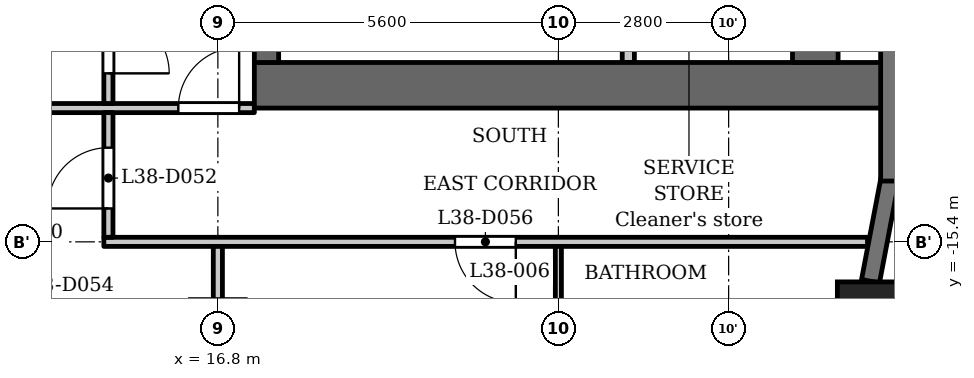
"""IFC4 building model, lengths in metres.
Left out: names, types, materials, properties, quantities, classifications, styles, units other than length and angle.
Written with IfcOpenShell. Run it as: python <this file> out.ifc"""

import sys

from ifc_helpers import new_model, si_unit, direction, frame, frame_2d, origin, origin_2d, place, context, subcontext, project, spatial, rectangle, extrude, element, fill, save


model = new_model("IFC4")
c1 = context("Model", 3, precision=1e-05, world=origin(), true_north=direction((0.0, 1.0)))
c2 = subcontext(c1, "Body", "Model", "MODEL_VIEW")
j1 = project(units=[si_unit("LENGTHUNIT", "METRE"), si_unit("PLANEANGLEUNIT", "RADIAN")], contexts=[c1])
p1 = place(None, origin())
s1 = spatial("IfcSite", under=j1, at=p1, CompositionType="ELEMENT")
p2 = place(p1, origin())
s2 = spatial("IfcBuilding", under=s1, at=p2, CompositionType="ELEMENT")
p3 = place(p2, frame((0.0, 0.0, 150.1)))
s3 = spatial("IfcBuildingStorey", under=s2, at=p3, CompositionType="ELEMENT", Elevation=150.1)
p4 = place(p3, frame((27.538, -16.609, 0.0), z_axis=(0.0, 0.0, 1.0), x_axis=(1.0, 0.0, 0.0)))
e1 = element("IfcColumn", 1, at=p4, inside=s3, PredefinedType="COLUMN", context=c2, shape_type="SweptSolid", body=[
    extrude(rectangle(XDim=1.1, YDim=1.1, at=origin_2d()), origin(), (0.0, 0.0, 1.0), 3.5),
])
p5 = place(p3, frame((27.533, -16.048, 0.0), z_axis=(0.0, 0.0, 1.0), x_axis=(0.187302784601, 0.982302227871, 0.0)))
e2 = element("IfcWall", 2, at=p5, inside=s3, PredefinedType="SOLIDWALL", context=c2, shape_type="SweptSolid", body=[
    extrude(rectangle(XDim=1.706, YDim=0.3, at=frame_2d((0.853, 0.0))), origin(), (0.0, 0.0, 1.0), 2.45),
])
p6 = place(p3, frame((27.85, -14.4, 0.0), z_axis=(0.0, 0.0, 1.0), x_axis=(0.0, 1.0, 0.0)))
e3 = element("IfcWall", 3, at=p6, inside=s3, PredefinedType="SOLIDWALL", context=c2, shape_type="SweptSolid", body=[
    extrude(rectangle(XDim=2.65, YDim=0.3, at=frame_2d((1.325, 0.0))), origin(), (0.0, 0.0, 1.0), 2.45),
])
p7 = place(p3, frame((17.4, -12.825, 0.0), z_axis=(0.0, 0.0, 1.0), x_axis=(1.0, 0.0, 0.0)))
e4 = element("IfcWall", 4, at=p7, inside=s3, PredefinedType="SHEAR", context=c2, shape_type="SweptSolid", body=[
    extrude(rectangle(XDim=10.4, YDim=0.75, at=frame_2d((5.2, 0.0))), origin(), (0.0, 0.0, 1.0), 3.2),
])
p8 = place(p3, frame((17.6, -12.45, 0.0), z_axis=(0.0, 0.0, 1.0), x_axis=(0.0, 1.0, 0.0)))
e5 = element("IfcWall", 5, at=p8, inside=s3, PredefinedType="SHEAR", context=c2, shape_type="SweptSolid", body=[
    extrude(rectangle(XDim=24.9, YDim=0.4, at=frame_2d((12.45, 0.0))), origin(), (0.0, 0.0, 1.0), 3.2),
])
p9 = place(p8, frame((6.325, 0.0, 0.0)))
e6 = element("IfcOpeningElement", 6, at=p9, cuts=e5, PredefinedType="OPENING", context=c2, shape_type="SweptSolid", body=[
    extrude(rectangle(XDim=0.9, YDim=2.1, at=frame_2d((0.45, 1.05))), frame((0.0, 0.21, 0.0), z_axis=(0.0, -1.0, 0.0), x_axis=(1.0, 0.0, 0.0)), (0.0, 0.0, 1.0), 0.42),
])
p10 = place(p8, frame((9.925, 0.0, 0.0)))
e7 = element("IfcOpeningElement", 7, at=p10, cuts=e5, PredefinedType="OPENING", context=c2, shape_type="SweptSolid", body=[
    extrude(rectangle(XDim=0.9, YDim=2.1, at=frame_2d((0.45, 1.05))), frame((0.0, 0.21, 0.0), z_axis=(0.0, -1.0, 0.0), x_axis=(1.0, 0.0, 0.0)), (0.0, 0.0, 1.0), 0.42),
])
p11 = place(p8, frame((15.6, 0.0, 0.0)))
e8 = element("IfcOpeningElement", 8, at=p11, cuts=e5, PredefinedType="OPENING", context=c2, shape_type="SweptSolid", body=[
    extrude(rectangle(XDim=1.1, YDim=2.1, at=frame_2d((0.55, 1.05))), frame((0.0, 0.21, 0.0), z_axis=(0.0, -1.0, 0.0), x_axis=(1.0, 0.0, 0.0)), (0.0, 0.0, 1.0), 0.42),
])
p12 = place(p8, frame((18.0, 0.0, 0.0)))
e9 = element("IfcOpeningElement", 9, at=p12, cuts=e5, PredefinedType="OPENING", context=c2, shape_type="SweptSolid", body=[
    extrude(rectangle(XDim=1.1, YDim=2.1, at=frame_2d((0.55, 1.05))), frame((0.0, 0.21, 0.0), z_axis=(0.0, -1.0, 0.0), x_axis=(1.0, 0.0, 0.0)), (0.0, 0.0, 1.0), 0.42),
])
p13 = place(p8, frame((23.025, 0.0, 0.0)))
e10 = element("IfcOpeningElement", 10, at=p13, cuts=e5, PredefinedType="OPENING", context=c2, shape_type="SweptSolid", body=[
    extrude(rectangle(XDim=1.1, YDim=2.1, at=frame_2d((0.55, 1.05))), frame((0.0, 0.21, 0.0), z_axis=(0.0, -1.0, 0.0), x_axis=(1.0, 0.0, 0.0)), (0.0, 0.0, 1.0), 0.42),
])
p14 = place(p8, frame((0.775, 0.0, 0.0)))
e11 = element("IfcOpeningElement", 11, at=p14, cuts=e5, PredefinedType="OPENING", context=c2, shape_type="SweptSolid", body=[
    extrude(rectangle(XDim=1.1, YDim=2.1, at=frame_2d((0.55, 1.05))), frame((0.0, 0.21, 0.0), z_axis=(0.0, -1.0, 0.0), x_axis=(1.0, 0.0, 0.0)), (0.0, 0.0, 1.0), 0.42),
])
p15 = place(p8, frame((12.925, 0.0, 0.0)))
e12 = element("IfcOpeningElement", 12, at=p15, cuts=e5, PredefinedType="OPENING", context=c2, shape_type="SweptSolid", body=[
    extrude(rectangle(XDim=1.8, YDim=2.1, at=frame_2d((0.9, 1.05))), frame((0.0, 0.21, 0.0), z_axis=(0.0, -1.0, 0.0), x_axis=(1.0, 0.0, 0.0)), (0.0, 0.0, 1.0), 0.42),
])
p16 = place(p3, frame((26.625, -12.45, 0.0), z_axis=(0.0, 0.0, 1.0), x_axis=(0.0, 1.0, 0.0)))
e13 = element("IfcWall", 13, at=p16, inside=s3, PredefinedType="SHEAR", context=c2, shape_type="SweptSolid", body=[
    extrude(rectangle(XDim=24.9, YDim=0.75, at=frame_2d((12.45, 0.0))), origin(), (0.0, 0.0, 1.0), 3.2),
])
p17 = place(p3, frame((23.55, -12.45, 0.0), z_axis=(0.0, 0.0, 1.0), x_axis=(0.0, 1.0, 0.0)))
e14 = element("IfcWall", 14, at=p17, inside=s3, PredefinedType="PARTITIONING", context=c2, shape_type="SweptSolid", body=[
    extrude(rectangle(XDim=2.65, YDim=0.2, at=frame_2d((1.325, 0.0))), origin(), (0.0, 0.0, 1.0), 3.2),
])
p18 = place(p17, frame((0.875, 0.0, 0.0)))
e15 = element("IfcOpeningElement", 15, at=p18, cuts=e14, PredefinedType="OPENING", context=c2, shape_type="SweptSolid", body=[
    extrude(rectangle(XDim=0.9, YDim=2.1, at=frame_2d((0.45, 1.05))), frame((0.0, 0.11, 0.0), z_axis=(0.0, -1.0, 0.0), x_axis=(1.0, 0.0, 0.0)), (0.0, 0.0, 1.0), 0.22),
])
p19 = place(p3, frame((14.925, -15.4, 0.0), z_axis=(0.0, 0.0, 1.0), x_axis=(1.0, 0.0, 0.0)))
e16 = element("IfcWall", 16, at=p19, inside=s3, PredefinedType="PARTITIONING", context=c2, shape_type="SweptSolid", body=[
    extrude(rectangle(XDim=12.559, YDim=0.15, at=frame_2d((6.279, 0.0))), origin(), (0.0, 0.0, 1.0), 3.2),
])
p20 = place(p19, frame((5.775, 0.0, 0.0)))
e17 = element("IfcOpeningElement", 17, at=p20, cuts=e16, PredefinedType="OPENING", context=c2, shape_type="SweptSolid", body=[
    extrude(rectangle(XDim=1.0, YDim=2.1, at=frame_2d((0.5, 1.05))), frame((0.0, 0.085, 0.0), z_axis=(0.0, -1.0, 0.0), x_axis=(1.0, 0.0, 0.0)), (0.0, 0.0, 1.0), 0.17),
])
p21 = place(p3, frame((-17.4, -13.2, 0.0), z_axis=(0.0, 0.0, 1.0), x_axis=(1.0, 0.0, 0.0)))
e18 = element("IfcWall", 18, at=p21, inside=s3, PredefinedType="PARTITIONING", context=c2, shape_type="SweptSolid", body=[
    extrude(rectangle(XDim=34.8, YDim=0.15, at=frame_2d((17.4, 0.0))), origin(), (0.0, 0.0, 1.0), 3.2),
])
p22 = place(p21, frame((0.15, 0.0, 0.0)))
e19 = element("IfcOpeningElement", 19, at=p22, cuts=e18, PredefinedType="OPENING", context=c2, shape_type="SweptSolid", body=[
    extrude(rectangle(XDim=1.0, YDim=2.1, at=frame_2d((0.5, 1.05))), frame((0.0, 0.085, 0.0), z_axis=(0.0, -1.0, 0.0), x_axis=(1.0, 0.0, 0.0)), (0.0, 0.0, 1.0), 0.17),
])
p23 = place(p21, frame((33.55, 0.0, 0.0)))
e20 = element("IfcOpeningElement", 20, at=p23, cuts=e18, PredefinedType="OPENING", context=c2, shape_type="SweptSolid", body=[
    extrude(rectangle(XDim=1.0, YDim=2.1, at=frame_2d((0.5, 1.05))), frame((0.0, 0.085, 0.0), z_axis=(0.0, -1.0, 0.0), x_axis=(1.0, 0.0, 0.0)), (0.0, 0.0, 1.0), 0.17),
])
p24 = place(p21, frame((15.7, 0.0, 0.0)))
e21 = element("IfcOpeningElement", 21, at=p24, cuts=e18, PredefinedType="OPENING", context=c2, shape_type="SweptSolid", body=[
    extrude(rectangle(XDim=1.0, YDim=2.1, at=frame_2d((0.5, 1.05))), frame((0.0, 0.085, 0.0), z_axis=(0.0, -1.0, 0.0), x_axis=(1.0, 0.0, 0.0)), (0.0, 0.0, 1.0), 0.17),
])
p25 = place(p3, frame((15.0, -15.325, 0.0), z_axis=(0.0, 0.0, 1.0), x_axis=(0.0, 1.0, 0.0)))
e22 = element("IfcWall", 22, at=p25, inside=s3, PredefinedType="PARTITIONING", context=c2, shape_type="SweptSolid", body=[
    extrude(rectangle(XDim=2.05, YDim=0.15, at=frame_2d((1.025, 0.0))), origin(), (0.0, 0.0, 1.0), 3.2),
])
p26 = place(p25, frame((0.474, 0.0, 0.0)))
e23 = element("IfcOpeningElement", 23, at=p26, cuts=e22, PredefinedType="OPENING", context=c2, shape_type="SweptSolid", body=[
    extrude(rectangle(XDim=1.0, YDim=2.1, at=frame_2d((0.5, 1.05))), frame((0.0, 0.085, 0.0), z_axis=(0.0, -1.0, 0.0), x_axis=(1.0, 0.0, 0.0)), (0.0, 0.0, 1.0), 0.17),
])
p27 = place(p3, frame((15.0, -13.125, 0.0), z_axis=(0.0, 0.0, 1.0), x_axis=(0.0, 1.0, 0.0)))
e24 = element("IfcWall", 24, at=p27, inside=s3, PredefinedType="PARTITIONING", context=c2, shape_type="SweptSolid", body=[
    extrude(rectangle(XDim=6.356, YDim=0.15, at=frame_2d((3.178, 0.0))), origin(), (0.0, 0.0, 1.0), 3.2),
])
p28 = place(p27, frame((0.496, 0.0, 0.0)))
e25 = element("IfcOpeningElement", 25, at=p28, cuts=e24, PredefinedType="OPENING", context=c2, shape_type="SweptSolid", body=[
    extrude(rectangle(XDim=1.0, YDim=2.1, at=frame_2d((0.5, 1.05))), frame((0.0, 0.085, 0.0), z_axis=(0.0, -1.0, 0.0), x_axis=(1.0, 0.0, 0.0)), (0.0, 0.0, 1.0), 0.17),
])
p29 = place(p3, frame((16.8, -22.93, 0.0), z_axis=(0.0, 0.0, 1.0), x_axis=(0.0, 1.0, 0.0)))
e26 = element("IfcWall", 26, at=p29, inside=s3, PredefinedType="PARTITIONING", context=c2, shape_type="SweptSolid", body=[
    extrude(rectangle(XDim=7.455, YDim=0.15, at=frame_2d((3.728, 0.0))), origin(), (0.0, 0.0, 1.0), 3.2),
])
p30 = place(p3, frame((22.4, -18.05, 0.0), z_axis=(0.0, 0.0, 1.0), x_axis=(0.0, 1.0, 0.0)))
e27 = element("IfcWall", 27, at=p30, inside=s3, PredefinedType="PARTITIONING", context=c2, shape_type="SweptSolid", body=[
    extrude(rectangle(XDim=2.575, YDim=0.1, at=frame_2d((1.288, 0.0))), origin(), (0.0, 0.0, 1.0), 3.2),
])
p31 = place(p28, origin())
e28 = element("IfcDoor", 28, at=p31, inside=s3, OperationType="SINGLE_SWING_LEFT", PredefinedType="DOOR", context=c2, shape_type="SweptSolid", body=[
    extrude(rectangle(XDim=1.0, YDim=2.1, at=frame_2d((0.5, 1.05))), frame((0.0, 0.025, 0.0), z_axis=(0.0, -1.0, 0.0), x_axis=(1.0, 0.0, 0.0)), (0.0, 0.0, 1.0), 0.05),
])
fill(e25, e28)
p32 = place(p23, origin())
e29 = element("IfcDoor", 29, at=p32, inside=s3, OperationType="SINGLE_SWING_LEFT", PredefinedType="DOOR", context=c2, shape_type="SweptSolid", body=[
    extrude(rectangle(XDim=1.0, YDim=2.1, at=frame_2d((0.5, 1.05))), frame((0.0, 0.025, 0.0), z_axis=(0.0, -1.0, 0.0), x_axis=(1.0, 0.0, 0.0)), (0.0, 0.0, 1.0), 0.05),
])
fill(e20, e29)
p33 = place(p26, origin())
e30 = element("IfcDoor", 30, at=p33, inside=s3, OperationType="SINGLE_SWING_RIGHT", PredefinedType="DOOR", context=c2, shape_type="SweptSolid", body=[
    extrude(rectangle(XDim=1.0, YDim=2.1, at=frame_2d((0.5, 1.05))), frame((0.0, 0.025, 0.0), z_axis=(0.0, -1.0, 0.0), x_axis=(1.0, 0.0, 0.0)), (0.0, 0.0, 1.0), 0.05),
])
fill(e23, e30)
p34 = place(p20, origin())
e31 = element("IfcDoor", 31, at=p34, inside=s3, OperationType="SINGLE_SWING_RIGHT", PredefinedType="DOOR", context=c2, shape_type="SweptSolid", body=[
    extrude(rectangle(XDim=1.0, YDim=2.1, at=frame_2d((0.5, 1.05))), frame((0.0, 0.025, 0.0), z_axis=(0.0, -1.0, 0.0), x_axis=(1.0, 0.0, 0.0)), (0.0, 0.0, 1.0), 0.05),
])
fill(e17, e31)
save(model, sys.argv[1])
